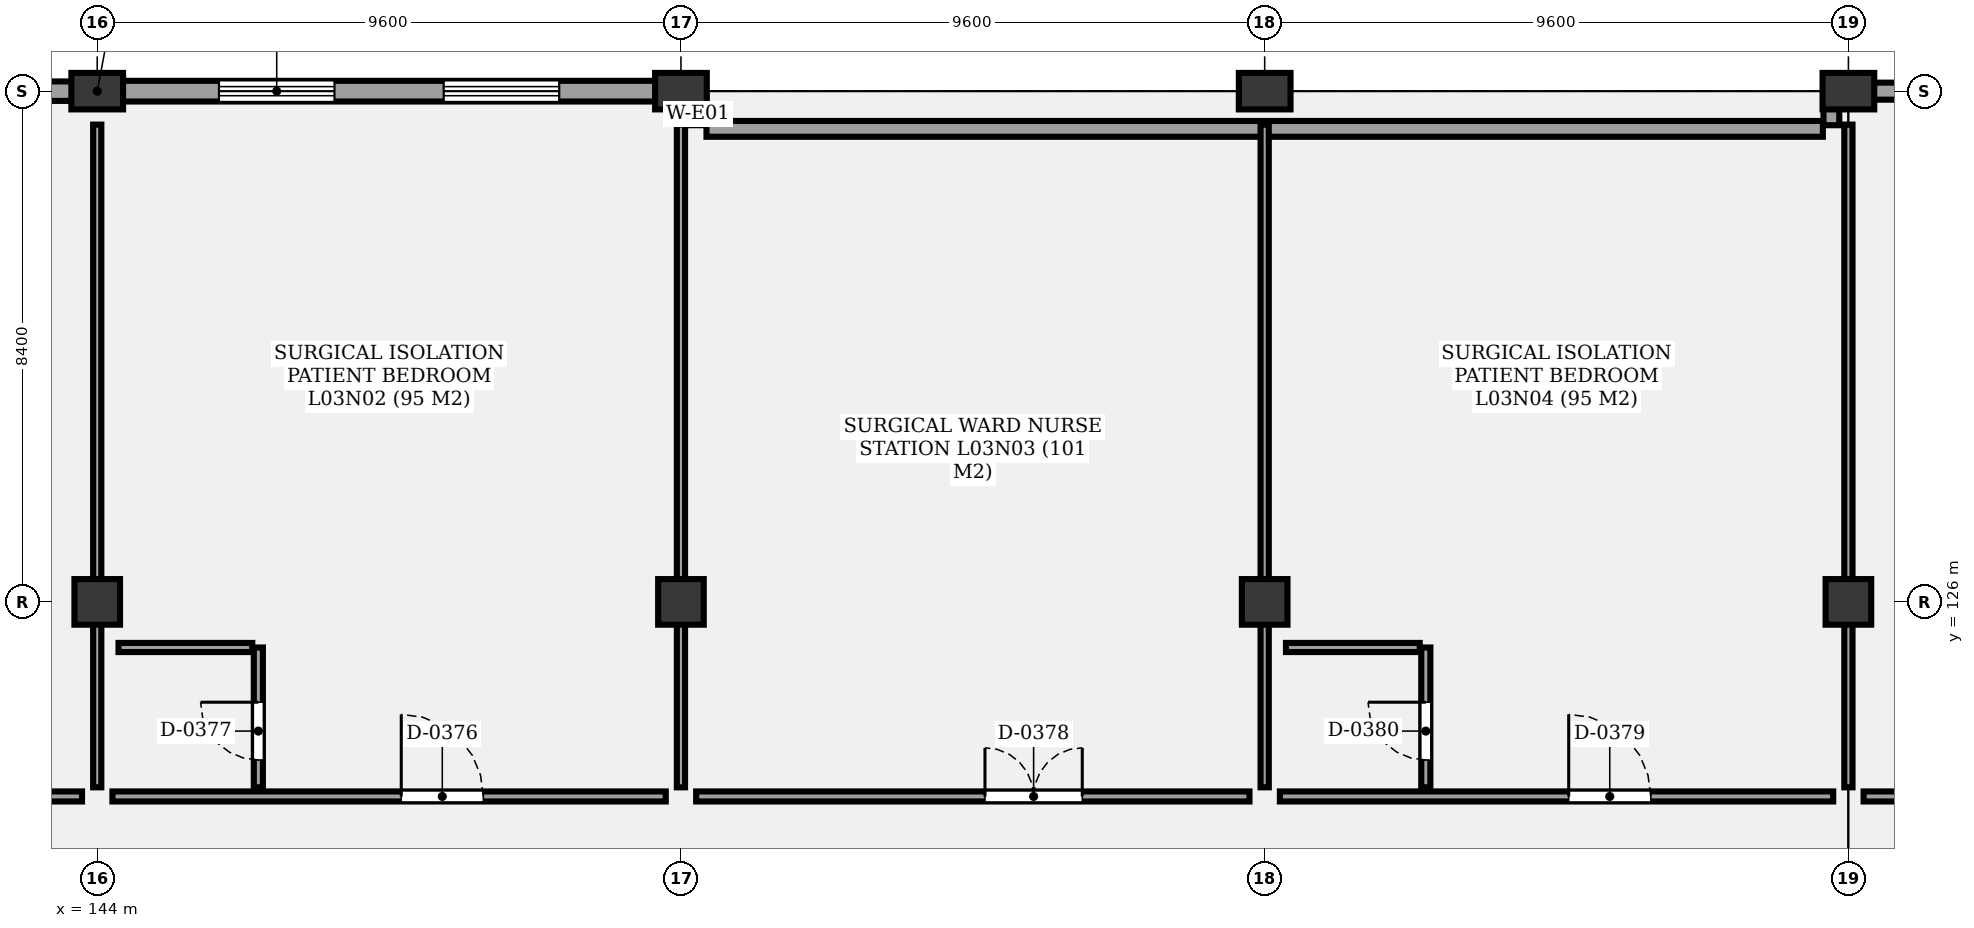
"""IFC4 building model, lengths in metres.
Left out: names, types, materials, properties, quantities, classifications, styles, units other than length and angle.
Written with IfcOpenShell. Run it as: python <this file> out.ifc"""

import sys

from ifc_helpers import new_model, si_unit, direction, frame, frame_2d, origin, origin_2d, place, context, subcontext, project, spatial, rectangle, extrude, element, fill, save


model = new_model("IFC4")
c1 = context("Model", 3, precision=1e-05, world=origin(), true_north=direction((0.0, 1.0)))
c2 = subcontext(c1, "Body", "Model", "MODEL_VIEW")
j1 = project(units=[si_unit("LENGTHUNIT", "METRE"), si_unit("PLANEANGLEUNIT", "RADIAN")], contexts=[c1])
p1 = place(None, origin())
s1 = spatial("IfcSite", under=j1, at=p1, CompositionType="ELEMENT")
p2 = place(p1, origin())
s2 = spatial("IfcBuilding", under=s1, at=p2, CompositionType="ELEMENT")
p3 = place(p2, frame((0.0, 0.0, 13.5)))
s3 = spatial("IfcBuildingStorey", under=s2, at=p3, CompositionType="ELEMENT", Elevation=13.5)
p4 = place(p3, frame((144.0, 126.0, 0.0), z_axis=(0.0, 0.0, 1.0), x_axis=(1.0, 0.0, 0.0)))
e1 = element("IfcColumn", 1, at=p4, inside=s3, PredefinedType="COLUMN", context=c2, shape_type="SweptSolid", body=[
    extrude(rectangle(XDim=0.75, YDim=0.75, at=origin_2d()), origin(), (0.0, 0.0, 1.0), 4.3),
])
p5 = place(p3, frame((144.0, 134.4, 0.0), z_axis=(0.0, 0.0, 1.0), x_axis=(1.0, 0.0, 0.0)))
e2 = element("IfcColumn", 2, at=p5, inside=s3, PredefinedType="COLUMN", context=c2, shape_type="SweptSolid", body=[
    extrude(rectangle(XDim=0.85, YDim=0.6, at=origin_2d()), origin(), (0.0, 0.0, 1.0), 4.3),
])
p6 = place(p3, frame((153.6, 126.0, 0.0), z_axis=(0.0, 0.0, 1.0), x_axis=(1.0, 0.0, 0.0)))
e3 = element("IfcColumn", 3, at=p6, inside=s3, PredefinedType="COLUMN", context=c2, shape_type="SweptSolid", body=[
    extrude(rectangle(XDim=0.75, YDim=0.75, at=origin_2d()), origin(), (0.0, 0.0, 1.0), 4.3),
])
p7 = place(p3, frame((153.6, 134.4, 0.0), z_axis=(0.0, 0.0, 1.0), x_axis=(1.0, 0.0, 0.0)))
e4 = element("IfcColumn", 4, at=p7, inside=s3, PredefinedType="COLUMN", context=c2, shape_type="SweptSolid", body=[
    extrude(rectangle(XDim=0.85, YDim=0.6, at=origin_2d()), origin(), (0.0, 0.0, 1.0), 4.3),
])
p8 = place(p3, frame((163.2, 126.0, 0.0), z_axis=(0.0, 0.0, 1.0), x_axis=(1.0, 0.0, 0.0)))
e5 = element("IfcColumn", 5, at=p8, inside=s3, PredefinedType="COLUMN", context=c2, shape_type="SweptSolid", body=[
    extrude(rectangle(XDim=0.75, YDim=0.75, at=origin_2d()), origin(), (0.0, 0.0, 1.0), 4.3),
])
p9 = place(p3, frame((163.2, 134.4, 0.0), z_axis=(0.0, 0.0, 1.0), x_axis=(1.0, 0.0, 0.0)))
e6 = element("IfcColumn", 6, at=p9, inside=s3, PredefinedType="COLUMN", context=c2, shape_type="SweptSolid", body=[
    extrude(rectangle(XDim=0.85, YDim=0.6, at=origin_2d()), origin(), (0.0, 0.0, 1.0), 4.3),
])
p10 = place(p3, frame((172.8, 126.0, 0.0), z_axis=(0.0, 0.0, 1.0), x_axis=(1.0, 0.0, 0.0)))
e7 = element("IfcColumn", 7, at=p10, inside=s3, PredefinedType="COLUMN", context=c2, shape_type="SweptSolid", body=[
    extrude(rectangle(XDim=0.75, YDim=0.75, at=origin_2d()), origin(), (0.0, 0.0, 1.0), 4.3),
])
p11 = place(p3, frame((172.8, 134.4, 0.0), z_axis=(0.0, 0.0, 1.0), x_axis=(1.0, 0.0, 0.0)))
e8 = element("IfcColumn", 8, at=p11, inside=s3, PredefinedType="COLUMN", context=c2, shape_type="SweptSolid", body=[
    extrude(rectangle(XDim=0.85, YDim=0.6, at=origin_2d()), origin(), (0.0, 0.0, 1.0), 4.3),
])
p12 = place(p3, frame((134.4, 134.4, 0.0), z_axis=(0.0, 0.0, 1.0), x_axis=(1.0, 0.0, 0.0)))
e9 = element("IfcWall", 9, at=p12, inside=s3, PredefinedType="SOLIDWALL", context=c2, shape_type="SweptSolid", body=[
    extrude(rectangle(XDim=9.6, YDim=0.32, at=frame_2d((4.8, 0.0))), origin(), (0.0, 0.0, 1.0), 3.49),
])
p13 = place(p12, frame((2.041, 0.0, 0.85)))
e10 = element("IfcOpeningElement", 10, at=p13, cuts=e9, PredefinedType="OPENING", context=c2, shape_type="SweptSolid", body=[
    extrude(rectangle(XDim=1.75, YDim=1.2, at=frame_2d((0.875, 0.6))), frame((0.0, 0.17, 0.0), z_axis=(0.0, -1.0, 0.0), x_axis=(1.0, 0.0, 0.0)), (0.0, 0.0, 1.0), 0.34),
])
p14 = place(p12, frame((5.809, 0.0, 0.85)))
e11 = element("IfcOpeningElement", 11, at=p14, cuts=e9, PredefinedType="OPENING", context=c2, shape_type="SweptSolid", body=[
    extrude(rectangle(XDim=1.75, YDim=1.2, at=frame_2d((0.875, 0.6))), frame((0.0, 0.17, 0.0), z_axis=(0.0, -1.0, 0.0), x_axis=(1.0, 0.0, 0.0)), (0.0, 0.0, 1.0), 0.34),
])
p15 = place(p3, frame((144.0, 134.4, 0.0), z_axis=(0.0, 0.0, 1.0), x_axis=(1.0, 0.0, 0.0)))
e12 = element("IfcWall", 12, at=p15, inside=s3, PredefinedType="SOLIDWALL", context=c2, shape_type="SweptSolid", body=[
    extrude(rectangle(XDim=9.6, YDim=0.34, at=frame_2d((4.8, 0.0))), origin(), (0.0, 0.0, 1.0), 3.49),
])
p16 = place(p15, frame((2.002, 0.0, 0.85)))
e13 = element("IfcOpeningElement", 13, at=p16, cuts=e12, PredefinedType="OPENING", context=c2, shape_type="SweptSolid", body=[
    extrude(rectangle(XDim=1.9, YDim=1.2, at=frame_2d((0.95, 0.6))), frame((0.0, 0.18, 0.0), z_axis=(0.0, -1.0, 0.0), x_axis=(1.0, 0.0, 0.0)), (0.0, 0.0, 1.0), 0.36),
])
p17 = place(p15, frame((5.698, 0.0, 0.85)))
e14 = element("IfcOpeningElement", 14, at=p17, cuts=e12, PredefinedType="OPENING", context=c2, shape_type="SweptSolid", body=[
    extrude(rectangle(XDim=1.9, YDim=1.2, at=frame_2d((0.95, 0.6))), frame((0.0, 0.18, 0.0), z_axis=(0.0, -1.0, 0.0), x_axis=(1.0, 0.0, 0.0)), (0.0, 0.0, 1.0), 0.36),
])
for number, where, z_axis, x_axis in (
    (15, (153.88, 134.2, 0.0), (0.0, 0.0, 1.0), (0.0, -1.0, 0.0)),
    (16, (172.52, 134.2, 0.0), (0.0, 0.0, 1.0), (0.0, -1.0, 0.0)),
):
    element("IfcWall", number, at=place(p3, frame(where, z_axis=z_axis, x_axis=x_axis)), inside=s3, PredefinedType="SOLIDWALL", context=c2, shape_type="SweptSolid", body=[
        extrude(rectangle(XDim=0.36, YDim=0.26, at=frame_2d((0.18, 0.0))), origin(), (0.0, 0.0, 1.0), 3.49),
    ])
p18 = place(p3, frame((154.02, 133.78, 0.0), z_axis=(0.0, 0.0, 1.0), x_axis=(1.0, 0.0, 0.0)))
e17 = element("IfcWall", 17, at=p18, inside=s3, PredefinedType="SOLIDWALL", context=c2, shape_type="SweptSolid", body=[
    extrude(rectangle(XDim=18.36, YDim=0.26, at=frame_2d((9.18, 0.0))), origin(), (0.0, 0.0, 1.0), 3.49),
])
p19 = place(p3, frame((172.8, 134.4, 0.0), z_axis=(0.0, 0.0, 1.0), x_axis=(1.0, 0.0, 0.0)))
e18 = element("IfcWall", 18, at=p19, inside=s3, PredefinedType="SOLIDWALL", context=c2, shape_type="SweptSolid", body=[
    extrude(rectangle(XDim=9.6, YDim=0.28, at=frame_2d((4.8, 0.0))), origin(), (0.0, 0.0, 1.0), 3.49),
])
p20 = place(p19, frame((2.002, 0.0, 0.85)))
e19 = element("IfcOpeningElement", 19, at=p20, cuts=e18, PredefinedType="OPENING", context=c2, shape_type="SweptSolid", body=[
    extrude(rectangle(XDim=1.9, YDim=1.2, at=frame_2d((0.95, 0.6))), frame((0.0, 0.15, 0.0), z_axis=(0.0, -1.0, 0.0), x_axis=(1.0, 0.0, 0.0)), (0.0, 0.0, 1.0), 0.3),
])
p21 = place(p19, frame((5.698, 0.0, 0.85)))
e20 = element("IfcOpeningElement", 20, at=p21, cuts=e18, PredefinedType="OPENING", context=c2, shape_type="SweptSolid", body=[
    extrude(rectangle(XDim=1.9, YDim=1.2, at=frame_2d((0.95, 0.6))), frame((0.0, 0.15, 0.0), z_axis=(0.0, -1.0, 0.0), x_axis=(1.0, 0.0, 0.0)), (0.0, 0.0, 1.0), 0.3),
])
p22 = place(p3, frame((134.65, 122.8, 0.0), z_axis=(0.0, 0.0, 1.0), x_axis=(1.0, 0.0, 0.0)))
e21 = element("IfcWall", 21, at=p22, inside=s3, PredefinedType="PARTITIONING", context=c2, shape_type="SweptSolid", body=[
    extrude(rectangle(XDim=9.1, YDim=0.165, at=frame_2d((4.55, 0.0))), origin(), (0.0, 0.0, 1.0), 3.4),
])
p23 = place(p22, frame((4.75, 0.0, 0.0)))
e22 = element("IfcOpeningElement", 22, at=p23, cuts=e21, PredefinedType="OPENING", context=c2, shape_type="SweptSolid", body=[
    extrude(rectangle(XDim=1.6, YDim=2.2, at=frame_2d((0.8, 1.1))), frame((0.0, 0.093, 0.0), z_axis=(0.0, -1.0, 0.0), x_axis=(1.0, 0.0, 0.0)), (0.0, 0.0, 1.0), 0.185),
])
p24 = place(p3, frame((144.25, 122.8, 0.0), z_axis=(0.0, 0.0, 1.0), x_axis=(1.0, 0.0, 0.0)))
e23 = element("IfcWall", 23, at=p24, inside=s3, PredefinedType="PARTITIONING", context=c2, shape_type="SweptSolid", body=[
    extrude(rectangle(XDim=9.1, YDim=0.165, at=frame_2d((4.55, 0.0))), origin(), (0.0, 0.0, 1.0), 3.4),
])
p25 = place(p24, frame((4.75, 0.0, 0.0)))
e24 = element("IfcOpeningElement", 24, at=p25, cuts=e23, PredefinedType="OPENING", context=c2, shape_type="SweptSolid", body=[
    extrude(rectangle(XDim=1.35, YDim=2.4, at=frame_2d((0.675, 1.2))), frame((0.0, 0.093, 0.0), z_axis=(0.0, -1.0, 0.0), x_axis=(1.0, 0.0, 0.0)), (0.0, 0.0, 1.0), 0.185),
])
p26 = place(p3, frame((146.65, 122.95, 0.0), z_axis=(0.0, 0.0, 1.0), x_axis=(0.0, 1.0, 0.0)))
e25 = element("IfcWall", 25, at=p26, inside=s3, PredefinedType="PARTITIONING", context=c2, shape_type="SweptSolid", body=[
    extrude(rectangle(XDim=2.3, YDim=0.15, at=frame_2d((1.15, 0.0))), origin(), (0.0, 0.0, 1.0), 3.4),
])
p27 = place(p26, frame((0.45, 0.0, 0.0)))
e26 = element("IfcOpeningElement", 26, at=p27, cuts=e25, PredefinedType="OPENING", context=c2, shape_type="SweptSolid", body=[
    extrude(rectangle(XDim=0.95, YDim=2.1, at=frame_2d((0.475, 1.05))), frame((0.0, 0.085, 0.0), z_axis=(0.0, -1.0, 0.0), x_axis=(1.0, 0.0, 0.0)), (0.0, 0.0, 1.0), 0.17),
])
p28 = place(p3, frame((144.35, 125.25, 0.0), z_axis=(0.0, 0.0, 1.0), x_axis=(1.0, 0.0, 0.0)))
e27 = element("IfcWall", 27, at=p28, inside=s3, PredefinedType="PARTITIONING", context=c2, shape_type="SweptSolid", body=[
    extrude(rectangle(XDim=2.2, YDim=0.15, at=frame_2d((1.1, 0.0))), origin(), (0.0, 0.0, 1.0), 3.4),
])
p29 = place(p3, frame((144.0, 122.95, 0.0), z_axis=(0.0, 0.0, 1.0), x_axis=(0.0, 1.0, 0.0)))
e28 = element("IfcWall", 28, at=p29, inside=s3, PredefinedType="PARTITIONING", context=c2, shape_type="SweptSolid", body=[
    extrude(rectangle(XDim=10.9, YDim=0.135, at=frame_2d((5.45, 0.0))), origin(), (0.0, 0.0, 1.0), 3.4),
])
p30 = place(p3, frame((153.85, 122.8, 0.0), z_axis=(0.0, 0.0, 1.0), x_axis=(1.0, 0.0, 0.0)))
e29 = element("IfcWall", 29, at=p30, inside=s3, PredefinedType="PARTITIONING", context=c2, shape_type="SweptSolid", body=[
    extrude(rectangle(XDim=9.1, YDim=0.165, at=frame_2d((4.55, 0.0))), origin(), (0.0, 0.0, 1.0), 3.4),
])
p31 = place(p30, frame((4.75, 0.0, 0.0)))
e30 = element("IfcOpeningElement", 30, at=p31, cuts=e29, PredefinedType="OPENING", context=c2, shape_type="SweptSolid", body=[
    extrude(rectangle(XDim=1.6, YDim=2.2, at=frame_2d((0.8, 1.1))), frame((0.0, 0.093, 0.0), z_axis=(0.0, -1.0, 0.0), x_axis=(1.0, 0.0, 0.0)), (0.0, 0.0, 1.0), 0.185),
])
p32 = place(p3, frame((153.6, 122.95, 0.0), z_axis=(0.0, 0.0, 1.0), x_axis=(0.0, 1.0, 0.0)))
e31 = element("IfcWall", 31, at=p32, inside=s3, PredefinedType="PARTITIONING", context=c2, shape_type="SweptSolid", body=[
    extrude(rectangle(XDim=10.9, YDim=0.135, at=frame_2d((5.45, 0.0))), origin(), (0.0, 0.0, 1.0), 3.4),
])
p33 = place(p3, frame((163.45, 122.8, 0.0), z_axis=(0.0, 0.0, 1.0), x_axis=(1.0, 0.0, 0.0)))
e32 = element("IfcWall", 32, at=p33, inside=s3, PredefinedType="PARTITIONING", context=c2, shape_type="SweptSolid", body=[
    extrude(rectangle(XDim=9.1, YDim=0.165, at=frame_2d((4.55, 0.0))), origin(), (0.0, 0.0, 1.0), 3.4),
])
p34 = place(p33, frame((4.75, 0.0, 0.0)))
e33 = element("IfcOpeningElement", 33, at=p34, cuts=e32, PredefinedType="OPENING", context=c2, shape_type="SweptSolid", body=[
    extrude(rectangle(XDim=1.35, YDim=2.4, at=frame_2d((0.675, 1.2))), frame((0.0, 0.093, 0.0), z_axis=(0.0, -1.0, 0.0), x_axis=(1.0, 0.0, 0.0)), (0.0, 0.0, 1.0), 0.185),
])
p35 = place(p3, frame((165.85, 122.95, 0.0), z_axis=(0.0, 0.0, 1.0), x_axis=(0.0, 1.0, 0.0)))
e34 = element("IfcWall", 34, at=p35, inside=s3, PredefinedType="PARTITIONING", context=c2, shape_type="SweptSolid", body=[
    extrude(rectangle(XDim=2.3, YDim=0.15, at=frame_2d((1.15, 0.0))), origin(), (0.0, 0.0, 1.0), 3.4),
])
p36 = place(p35, frame((0.45, 0.0, 0.0)))
e35 = element("IfcOpeningElement", 35, at=p36, cuts=e34, PredefinedType="OPENING", context=c2, shape_type="SweptSolid", body=[
    extrude(rectangle(XDim=0.95, YDim=2.1, at=frame_2d((0.475, 1.05))), frame((0.0, 0.085, 0.0), z_axis=(0.0, -1.0, 0.0), x_axis=(1.0, 0.0, 0.0)), (0.0, 0.0, 1.0), 0.17),
])
p37 = place(p3, frame((163.55, 125.25, 0.0), z_axis=(0.0, 0.0, 1.0), x_axis=(1.0, 0.0, 0.0)))
e36 = element("IfcWall", 36, at=p37, inside=s3, PredefinedType="PARTITIONING", context=c2, shape_type="SweptSolid", body=[
    extrude(rectangle(XDim=2.2, YDim=0.15, at=frame_2d((1.1, 0.0))), origin(), (0.0, 0.0, 1.0), 3.4),
])
p38 = place(p3, frame((163.2, 122.95, 0.0), z_axis=(0.0, 0.0, 1.0), x_axis=(0.0, 1.0, 0.0)))
e37 = element("IfcWall", 37, at=p38, inside=s3, PredefinedType="PARTITIONING", context=c2, shape_type="SweptSolid", body=[
    extrude(rectangle(XDim=10.9, YDim=0.135, at=frame_2d((5.45, 0.0))), origin(), (0.0, 0.0, 1.0), 3.4),
])
p39 = place(p3, frame((173.05, 122.8, 0.0), z_axis=(0.0, 0.0, 1.0), x_axis=(1.0, 0.0, 0.0)))
e38 = element("IfcWall", 38, at=p39, inside=s3, PredefinedType="PARTITIONING", context=c2, shape_type="SweptSolid", body=[
    extrude(rectangle(XDim=9.1, YDim=0.165, at=frame_2d((4.55, 0.0))), origin(), (0.0, 0.0, 1.0), 3.4),
])
p40 = place(p39, frame((4.75, 0.0, 0.0)))
e39 = element("IfcOpeningElement", 39, at=p40, cuts=e38, PredefinedType="OPENING", context=c2, shape_type="SweptSolid", body=[
    extrude(rectangle(XDim=1.6, YDim=2.2, at=frame_2d((0.8, 1.1))), frame((0.0, 0.093, 0.0), z_axis=(0.0, -1.0, 0.0), x_axis=(1.0, 0.0, 0.0)), (0.0, 0.0, 1.0), 0.185),
])
p41 = place(p3, frame((172.8, 122.95, 0.0), z_axis=(0.0, 0.0, 1.0), x_axis=(0.0, 1.0, 0.0)))
e40 = element("IfcWall", 40, at=p41, inside=s3, PredefinedType="PARTITIONING", context=c2, shape_type="SweptSolid", body=[
    extrude(rectangle(XDim=10.9, YDim=0.135, at=frame_2d((5.45, 0.0))), origin(), (0.0, 0.0, 1.0), 3.4),
])
p42 = place(p16, origin())
e41 = element("IfcWindow", 41, at=p42, inside=s3, PartitioningType="SINGLE_PANEL", PredefinedType="WINDOW", context=c2, shape_type="SweptSolid", body=[
    extrude(rectangle(XDim=1.9, YDim=1.2, at=frame_2d((0.95, 0.6))), frame((0.0, 0.03, 0.0), z_axis=(0.0, -1.0, 0.0), x_axis=(1.0, 0.0, 0.0)), (0.0, 0.0, 1.0), 0.06),
])
fill(e13, e41)
p43 = place(p17, origin())
e42 = element("IfcWindow", 42, at=p43, inside=s3, PartitioningType="SINGLE_PANEL", PredefinedType="WINDOW", context=c2, shape_type="SweptSolid", body=[
    extrude(rectangle(XDim=1.9, YDim=1.2, at=frame_2d((0.95, 0.6))), frame((0.0, 0.03, 0.0), z_axis=(0.0, -1.0, 0.0), x_axis=(1.0, 0.0, 0.0)), (0.0, 0.0, 1.0), 0.06),
])
fill(e14, e42)
p44 = place(p25, origin())
e43 = element("IfcDoor", 43, at=p44, inside=s3, OperationType="SINGLE_SWING_LEFT", PredefinedType="DOOR", context=c2, shape_type="SweptSolid", body=[
    extrude(rectangle(XDim=1.35, YDim=2.4, at=frame_2d((0.675, 1.2))), frame((0.0, 0.025, 0.0), z_axis=(0.0, -1.0, 0.0), x_axis=(1.0, 0.0, 0.0)), (0.0, 0.0, 1.0), 0.05),
])
fill(e24, e43)
p45 = place(p27, origin())
e44 = element("IfcDoor", 44, at=p45, inside=s3, OperationType="SINGLE_SWING_RIGHT", PredefinedType="DOOR", context=c2, shape_type="SweptSolid", body=[
    extrude(rectangle(XDim=0.95, YDim=2.1, at=frame_2d((0.475, 1.05))), frame((0.0, 0.025, 0.0), z_axis=(0.0, -1.0, 0.0), x_axis=(1.0, 0.0, 0.0)), (0.0, 0.0, 1.0), 0.05),
])
fill(e26, e44)
p46 = place(p31, origin())
e45 = element("IfcDoor", 45, at=p46, inside=s3, OperationType="DOUBLE_DOOR_SINGLE_SWING", PredefinedType="DOOR", context=c2, shape_type="SweptSolid", body=[
    extrude(rectangle(XDim=1.6, YDim=2.2, at=frame_2d((0.8, 1.1))), frame((0.0, 0.025, 0.0), z_axis=(0.0, -1.0, 0.0), x_axis=(1.0, 0.0, 0.0)), (0.0, 0.0, 1.0), 0.05),
])
fill(e30, e45)
p47 = place(p34, origin())
e46 = element("IfcDoor", 46, at=p47, inside=s3, OperationType="SINGLE_SWING_LEFT", PredefinedType="DOOR", context=c2, shape_type="SweptSolid", body=[
    extrude(rectangle(XDim=1.35, YDim=2.4, at=frame_2d((0.675, 1.2))), frame((0.0, 0.025, 0.0), z_axis=(0.0, -1.0, 0.0), x_axis=(1.0, 0.0, 0.0)), (0.0, 0.0, 1.0), 0.05),
])
fill(e33, e46)
p48 = place(p36, origin())
e47 = element("IfcDoor", 47, at=p48, inside=s3, OperationType="SINGLE_SWING_RIGHT", PredefinedType="DOOR", context=c2, shape_type="SweptSolid", body=[
    extrude(rectangle(XDim=0.95, YDim=2.1, at=frame_2d((0.475, 1.05))), frame((0.0, 0.025, 0.0), z_axis=(0.0, -1.0, 0.0), x_axis=(1.0, 0.0, 0.0)), (0.0, 0.0, 1.0), 0.05),
])
fill(e35, e47)
save(model, sys.argv[1])
